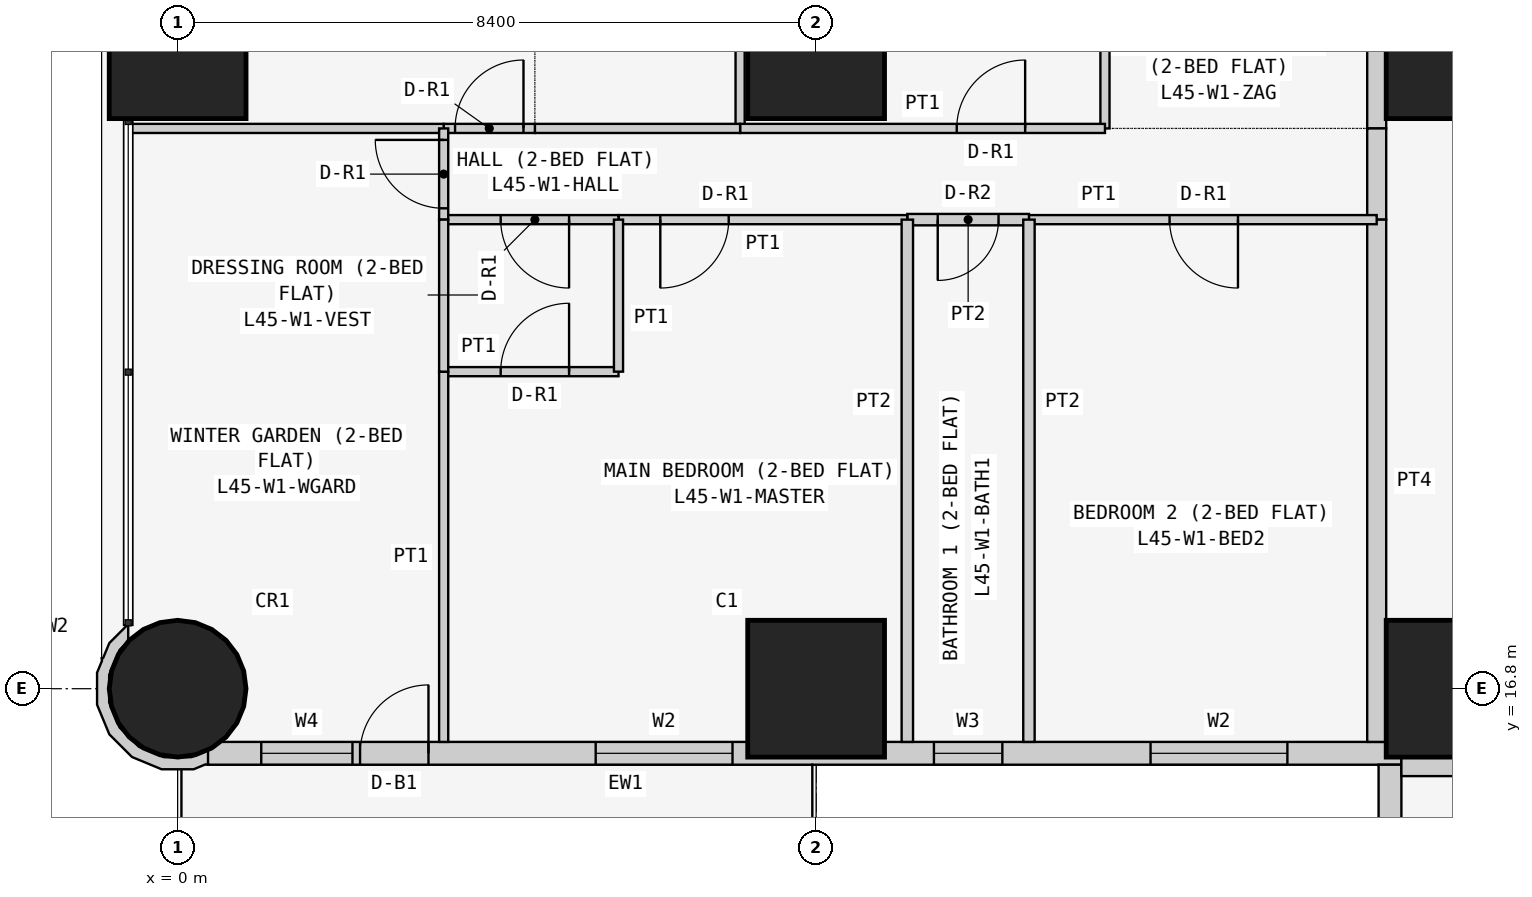
"""IFC4 building model, lengths in metres.
Left out: names, types, materials, properties, quantities, classifications, styles, units other than length and angle.
Written with IfcOpenShell. Run it as: python <this file> out.ifc"""

import sys

from ifc_helpers import new_model, si_unit, direction, frame, frame_2d, origin, origin_2d, place, context, subcontext, project, spatial, polyline, rectangle, circle, outline, extrude, element, fill, save


model = new_model("IFC4")
c1 = context("Model", 3, precision=1e-05, world=origin(), true_north=direction((0.0, 1.0)))
c2 = subcontext(c1, "Body", "Model", "MODEL_VIEW")
j1 = project(units=[si_unit("LENGTHUNIT", "METRE"), si_unit("PLANEANGLEUNIT", "RADIAN")], contexts=[c1])
p1 = place(None, origin())
s1 = spatial("IfcSite", under=j1, at=p1, CompositionType="ELEMENT")
p2 = place(p1, origin())
s2 = spatial("IfcBuilding", under=s1, at=p2, CompositionType="ELEMENT")
p3 = place(p2, frame((0.0, 0.0, 173.7)))
s3 = spatial("IfcBuildingStorey", under=s2, at=p3, CompositionType="ELEMENT", Elevation=173.7)
p4 = place(p3, frame((0.0, 16.8, 0.0), z_axis=(0.0, 0.0, 1.0), x_axis=(1.0, 0.0, 0.0)))
e1 = element("IfcColumn", 1, at=p4, inside=s3, PredefinedType="COLUMN", context=c2, shape_type="SweptSolid", body=[
    extrude(circle(Radius=0.9, at=origin_2d()), origin(), (0.0, 0.0, 1.0), 3.6),
])
for number, where, z_axis, x_axis in (
    (2, (0.0, 25.2, 0.0), (0.0, 0.0, 1.0), (1.0, 0.0, 0.0)),
    (3, (8.4, 16.8, 0.0), (0.0, 0.0, 1.0), (1.0, 0.0, 0.0)),
    (4, (8.4, 25.2, 0.0), (0.0, 0.0, 1.0), (1.0, 0.0, 0.0)),
    (5, (16.8, 16.8, 0.0), (0.0, 0.0, 1.0), (1.0, 0.0, 0.0)),
    (6, (16.8, 25.2, 0.0), (0.0, 0.0, 1.0), (1.0, 0.0, 0.0)),
):
    element("IfcColumn", number, at=place(p3, frame(where, z_axis=z_axis, x_axis=x_axis)), inside=s3, PredefinedType="COLUMN", context=c2, shape_type="SweptSolid", body=[
        extrude(rectangle(XDim=1.8, YDim=1.8, at=origin_2d()), origin(), (0.0, 0.0, 1.0), 3.6),
    ])
p5 = place(p3, frame((0.4, 15.95, 0.0), z_axis=(0.0, 0.0, 1.0), x_axis=(1.0, 0.0, 0.0)))
e7 = element("IfcWall", 7, at=p5, inside=s3, PredefinedType="SOLIDWALL", context=c2, shape_type="SweptSolid", body=[
    extrude(rectangle(XDim=15.7, YDim=0.3, at=frame_2d((7.85, 0.0))), origin(), (0.0, 0.0, 1.0), 3.35),
])
p6 = place(p5, frame((12.4, 0.0, 0.9)))
e8 = element("IfcOpeningElement", 8, at=p6, cuts=e7, PredefinedType="OPENING", context=c2, shape_type="SweptSolid", body=[
    extrude(rectangle(XDim=1.8, YDim=1.5, at=frame_2d((0.9, 0.75))), frame((0.0, 0.16, 0.0), z_axis=(0.0, -1.0, 0.0), x_axis=(1.0, 0.0, 0.0)), (0.0, 0.0, 1.0), 0.32),
])
p7 = place(p5, frame((9.55, 0.0, 1.5)))
e9 = element("IfcOpeningElement", 9, at=p7, cuts=e7, PredefinedType="OPENING", context=c2, shape_type="SweptSolid", body=[
    extrude(rectangle(XDim=0.9, YDim=0.7, at=frame_2d((0.45, 0.35))), frame((0.0, 0.16, 0.0), z_axis=(0.0, -1.0, 0.0), x_axis=(1.0, 0.0, 0.0)), (0.0, 0.0, 1.0), 0.32),
])
p8 = place(p5, frame((5.1, 0.0, 0.9)))
e10 = element("IfcOpeningElement", 10, at=p8, cuts=e7, PredefinedType="OPENING", context=c2, shape_type="SweptSolid", body=[
    extrude(rectangle(XDim=1.8, YDim=1.5, at=frame_2d((0.9, 0.75))), frame((0.0, 0.16, 0.0), z_axis=(0.0, -1.0, 0.0), x_axis=(1.0, 0.0, 0.0)), (0.0, 0.0, 1.0), 0.32),
])
p9 = place(p5, frame((2.0, 0.0, 0.0)))
e11 = element("IfcOpeningElement", 11, at=p9, cuts=e7, PredefinedType="OPENING", context=c2, shape_type="SweptSolid", body=[
    extrude(rectangle(XDim=0.9, YDim=2.4, at=frame_2d((0.45, 1.2))), frame((0.0, 0.16, 0.0), z_axis=(0.0, -1.0, 0.0), x_axis=(1.0, 0.0, 0.0)), (0.0, 0.0, 1.0), 0.32),
])
p10 = place(p5, frame((0.7, 0.0, 0.9)))
e12 = element("IfcOpeningElement", 12, at=p10, cuts=e7, PredefinedType="OPENING", context=c2, shape_type="SweptSolid", body=[
    extrude(rectangle(XDim=1.2, YDim=1.5, at=frame_2d((0.6, 0.75))), frame((0.0, 0.16, 0.0), z_axis=(0.0, -1.0, 0.0), x_axis=(1.0, 0.0, 0.0)), (0.0, 0.0, 1.0), 0.32),
])
p11 = place(p3, frame((15.95, 15.8, 0.0), z_axis=(0.0, 0.0, 1.0), x_axis=(0.0, -1.0, 0.0)))
e13 = element("IfcWall", 13, at=p11, inside=s3, PredefinedType="SOLIDWALL", context=c2, shape_type="SweptSolid", body=[
    extrude(rectangle(XDim=7.0, YDim=0.3, at=frame_2d((3.5, 0.0))), origin(), (0.0, 0.0, 1.0), 3.35),
])
p12 = place(p11, frame((1.5, 0.0, 0.9)))
e14 = element("IfcOpeningElement", 14, at=p12, cuts=e13, PredefinedType="OPENING", context=c2, shape_type="SweptSolid", body=[
    extrude(rectangle(XDim=2.4, YDim=1.5, at=frame_2d((1.2, 0.75))), frame((0.0, 0.16, 0.0), z_axis=(0.0, -1.0, 0.0), x_axis=(1.0, 0.0, 0.0)), (0.0, 0.0, 1.0), 0.32),
])
p13 = place(p11, frame((5.05, 0.0, 0.9)))
e15 = element("IfcOpeningElement", 15, at=p13, cuts=e13, PredefinedType="OPENING", context=c2, shape_type="SweptSolid", body=[
    extrude(rectangle(XDim=1.2, YDim=1.5, at=frame_2d((0.6, 0.75))), frame((0.0, 0.16, 0.0), z_axis=(0.0, -1.0, 0.0), x_axis=(1.0, 0.0, 0.0)), (0.0, 0.0, 1.0), 0.32),
])
p14 = place(p3, frame((-0.611, 17.567, 0.0), z_axis=(0.0, 0.0, 1.0), x_axis=(-0.926129809145, -0.377204953059, 0.0)))
e16 = element("IfcWall", 16, at=p14, inside=s3, PredefinedType="SOLIDWALL", context=c2, shape_type="SweptSolid", body=[
    extrude(outline(polyline([(-0.269, 2.017), (-0.37, 1.841), (-0.102, 1.842), (0.23, 1.707), (0.485, 1.455), (0.624, 1.125), (0.626, 0.766), (0.49, 0.434), (0.239, 0.179), (0.09, 0.117), (0.011, -0.078), (0.024, -0.083), (0.33, 0.045), (0.48, 0.197), (0.499, 0.193), (0.508, 0.225), (0.626, 0.345), (0.785, 0.736), (0.782, 1.157), (0.619, 1.546), (0.319, 1.842), (-0.072, 2.001), (-0.24, 2.0), (-0.269, 2.017)])), origin(), (0.0, 0.0, 1.0), 3.35),
])
p15 = place(p3, frame((22.971, 15.775, 0.0), z_axis=(0.0, 0.0, 1.0), x_axis=(-1.0, 0.0, 0.0)))
e17 = element("IfcWall", 17, at=p15, inside=s3, PredefinedType="PARTITIONING", context=c2, shape_type="SweptSolid", body=[
    extrude(rectangle(XDim=6.871, YDim=0.25, at=frame_2d((3.436, 0.0))), origin(), (0.0, 0.0, 1.0), 3.35),
])
p16 = place(p3, frame((15.775, 24.171, 0.0), z_axis=(0.0, 0.0, 1.0), x_axis=(0.0, 1.0, 0.0)))
e18 = element("IfcWall", 18, at=p16, inside=s3, PredefinedType="PARTITIONING", context=c2, shape_type="SweptSolid", body=[
    extrude(rectangle(XDim=5.229, YDim=0.25, at=frame_2d((2.615, 0.0))), origin(), (0.0, 0.0, 1.0), 3.35),
])
p17 = place(p16, frame((2.129, 0.0, 0.0)))
e19 = element("IfcOpeningElement", 19, at=p17, cuts=e18, PredefinedType="OPENING", context=c2, shape_type="SweptSolid", body=[
    extrude(rectangle(XDim=1.0, YDim=2.1, at=frame_2d((0.5, 1.05))), frame((0.0, 0.135, 0.0), z_axis=(0.0, -1.0, 0.0), x_axis=(1.0, 0.0, 0.0)), (0.0, 0.0, 1.0), 0.27),
])
p18 = place(p3, frame((15.775, 22.971, 0.0), z_axis=(0.0, 0.0, 1.0), x_axis=(0.0, 1.0, 0.0)))
e20 = element("IfcWall", 20, at=p18, inside=s3, PredefinedType="PARTITIONING", context=c2, shape_type="SweptSolid", body=[
    extrude(rectangle(XDim=1.2, YDim=0.25, at=frame_2d((0.6, 0.0))), origin(), (0.0, 0.0, 1.0), 3.35),
])
p19 = place(p3, frame((15.775, 16.1, 0.0), z_axis=(0.0, 0.0, 1.0), x_axis=(0.0, 1.0, 0.0)))
e21 = element("IfcWall", 21, at=p19, inside=s3, PredefinedType="PARTITIONING", context=c2, shape_type="SweptSolid", body=[
    extrude(rectangle(XDim=6.871, YDim=0.25, at=frame_2d((3.436, 0.0))), origin(), (0.0, 0.0, 1.0), 3.35),
])
for number, where, z_axis, x_axis in (
    (22, (12.2, 29.4, 0.0), (0.0, 0.0, 1.0), (0.0, -1.0, 0.0)),
    (23, (7.4, 29.4, 0.0), (0.0, 0.0, 1.0), (0.0, -1.0, 0.0)),
):
    element("IfcWall", number, at=place(p3, frame(where, z_axis=z_axis, x_axis=x_axis)), inside=s3, PredefinedType="PARTITIONING", context=c2, shape_type="SweptSolid", body=[
        extrude(rectangle(XDim=5.229, YDim=0.12, at=frame_2d((2.615, 0.0))), origin(), (0.0, 0.0, 1.0), 3.35),
    ])
p20 = place(p3, frame((7.4, 24.171, 0.0), z_axis=(0.0, 0.0, 1.0), x_axis=(1.0, 0.0, 0.0)))
e24 = element("IfcWall", 24, at=p20, inside=s3, PredefinedType="PARTITIONING", context=c2, shape_type="SweptSolid", body=[
    extrude(rectangle(XDim=4.8, YDim=0.12, at=frame_2d((2.4, 0.0))), origin(), (0.0, 0.0, 1.0), 3.35),
])
p21 = place(p20, frame((2.85, 0.0, 0.0)))
e25 = element("IfcOpeningElement", 25, at=p21, cuts=e24, PredefinedType="OPENING", context=c2, shape_type="SweptSolid", body=[
    extrude(rectangle(XDim=0.9, YDim=2.1, at=frame_2d((0.45, 1.05))), frame((0.0, 0.07, 0.0), z_axis=(0.0, -1.0, 0.0), x_axis=(1.0, 0.0, 0.0)), (0.0, 0.0, 1.0), 0.14),
])
p22 = place(p3, frame((4.7, 24.171, 0.0), z_axis=(0.0, 0.0, 1.0), x_axis=(1.0, 0.0, 0.0)))
e26 = element("IfcWall", 26, at=p22, inside=s3, PredefinedType="PARTITIONING", context=c2, shape_type="SweptSolid", body=[
    extrude(rectangle(XDim=2.7, YDim=0.12, at=frame_2d((1.35, 0.0))), origin(), (0.0, 0.0, 1.0), 3.35),
])
p23 = place(p3, frame((3.5, 24.171, 0.0), z_axis=(0.0, 0.0, 1.0), x_axis=(1.0, 0.0, 0.0)))
e27 = element("IfcWall", 27, at=p23, inside=s3, PredefinedType="PARTITIONING", context=c2, shape_type="SweptSolid", body=[
    extrude(rectangle(XDim=1.2, YDim=0.12, at=frame_2d((0.6, 0.0))), origin(), (0.0, 0.0, 1.0), 3.35),
])
p24 = place(p23, frame((0.15, 0.0, 0.0)))
e28 = element("IfcOpeningElement", 28, at=p24, cuts=e27, PredefinedType="OPENING", context=c2, shape_type="SweptSolid", body=[
    extrude(rectangle(XDim=0.9, YDim=2.1, at=frame_2d((0.45, 1.05))), frame((0.0, 0.07, 0.0), z_axis=(0.0, -1.0, 0.0), x_axis=(1.0, 0.0, 0.0)), (0.0, 0.0, 1.0), 0.14),
])
p25 = place(p3, frame((-0.65, 24.171, 0.0), z_axis=(0.0, 0.0, 1.0), x_axis=(1.0, 0.0, 0.0)))
e29 = element("IfcWall", 29, at=p25, inside=s3, PredefinedType="PARTITIONING", context=c2, shape_type="SweptSolid", body=[
    extrude(rectangle(XDim=4.15, YDim=0.12, at=frame_2d((2.075, 0.0))), origin(), (0.0, 0.0, 1.0), 3.35),
])
p26 = place(p3, frame((11.2, 22.971, 0.0), z_axis=(0.0, 0.0, 1.0), x_axis=(1.0, 0.0, 0.0)))
e30 = element("IfcWall", 30, at=p26, inside=s3, PredefinedType="PARTITIONING", context=c2, shape_type="SweptSolid", body=[
    extrude(rectangle(XDim=4.575, YDim=0.12, at=frame_2d((2.288, 0.0))), origin(), (0.0, 0.0, 1.0), 3.35),
])
p27 = place(p26, frame((1.85, 0.0, 0.0)))
e31 = element("IfcOpeningElement", 31, at=p27, cuts=e30, PredefinedType="OPENING", context=c2, shape_type="SweptSolid", body=[
    extrude(rectangle(XDim=0.9, YDim=2.1, at=frame_2d((0.45, 1.05))), frame((0.0, 0.07, 0.0), z_axis=(0.0, -1.0, 0.0), x_axis=(1.0, 0.0, 0.0)), (0.0, 0.0, 1.0), 0.14),
])
p28 = place(p3, frame((9.6, 22.971, 0.0), z_axis=(0.0, 0.0, 1.0), x_axis=(1.0, 0.0, 0.0)))
e32 = element("IfcWall", 32, at=p28, inside=s3, PredefinedType="PARTITIONING", context=c2, shape_type="SweptSolid", body=[
    extrude(rectangle(XDim=1.6, YDim=0.15, at=frame_2d((0.8, 0.0))), origin(), (0.0, 0.0, 1.0), 3.35),
])
p29 = place(p28, frame((0.4, 0.0, 0.0)))
e33 = element("IfcOpeningElement", 33, at=p29, cuts=e32, PredefinedType="OPENING", context=c2, shape_type="SweptSolid", body=[
    extrude(rectangle(XDim=0.8, YDim=2.1, at=frame_2d((0.4, 1.05))), frame((0.0, 0.085, 0.0), z_axis=(0.0, -1.0, 0.0), x_axis=(1.0, 0.0, 0.0)), (0.0, 0.0, 1.0), 0.17),
])
p30 = place(p3, frame((5.8, 22.971, 0.0), z_axis=(0.0, 0.0, 1.0), x_axis=(1.0, 0.0, 0.0)))
e34 = element("IfcWall", 34, at=p30, inside=s3, PredefinedType="PARTITIONING", context=c2, shape_type="SweptSolid", body=[
    extrude(rectangle(XDim=3.8, YDim=0.12, at=frame_2d((1.9, 0.0))), origin(), (0.0, 0.0, 1.0), 3.35),
])
p31 = place(p30, frame((0.55, 0.0, 0.0)))
e35 = element("IfcOpeningElement", 35, at=p31, cuts=e34, PredefinedType="OPENING", context=c2, shape_type="SweptSolid", body=[
    extrude(rectangle(XDim=0.9, YDim=2.1, at=frame_2d((0.45, 1.05))), frame((0.0, 0.07, 0.0), z_axis=(0.0, -1.0, 0.0), x_axis=(1.0, 0.0, 0.0)), (0.0, 0.0, 1.0), 0.14),
])
p32 = place(p3, frame((3.5, 22.971, 0.0), z_axis=(0.0, 0.0, 1.0), x_axis=(1.0, 0.0, 0.0)))
e36 = element("IfcWall", 36, at=p32, inside=s3, PredefinedType="PARTITIONING", context=c2, shape_type="SweptSolid", body=[
    extrude(rectangle(XDim=2.3, YDim=0.12, at=frame_2d((1.15, 0.0))), origin(), (0.0, 0.0, 1.0), 3.35),
])
p33 = place(p32, frame((0.75, 0.0, 0.0)))
e37 = element("IfcOpeningElement", 37, at=p33, cuts=e36, PredefinedType="OPENING", context=c2, shape_type="SweptSolid", body=[
    extrude(rectangle(XDim=0.9, YDim=2.1, at=frame_2d((0.45, 1.05))), frame((0.0, 0.07, 0.0), z_axis=(0.0, -1.0, 0.0), x_axis=(1.0, 0.0, 0.0)), (0.0, 0.0, 1.0), 0.14),
])
p34 = place(p3, frame((3.5, 24.171, 0.0), z_axis=(0.0, 0.0, 1.0), x_axis=(0.0, -1.0, 0.0)))
e38 = element("IfcWall", 38, at=p34, inside=s3, PredefinedType="PARTITIONING", context=c2, shape_type="SweptSolid", body=[
    extrude(rectangle(XDim=1.2, YDim=0.12, at=frame_2d((0.6, 0.0))), origin(), (0.0, 0.0, 1.0), 3.35),
])
p35 = place(p34, frame((0.151, 0.0, 0.0)))
e39 = element("IfcOpeningElement", 39, at=p35, cuts=e38, PredefinedType="OPENING", context=c2, shape_type="SweptSolid", body=[
    extrude(rectangle(XDim=0.9, YDim=2.1, at=frame_2d((0.45, 1.05))), frame((0.0, 0.07, 0.0), z_axis=(0.0, -1.0, 0.0), x_axis=(1.0, 0.0, 0.0)), (0.0, 0.0, 1.0), 0.14),
])
for number, where, z_axis, x_axis in (
    (40, (11.2, 22.971, 0.0), (0.0, 0.0, 1.0), (0.0, -1.0, 0.0)),
    (41, (9.6, 22.971, 0.0), (0.0, 0.0, 1.0), (0.0, -1.0, 0.0)),
):
    element("IfcWall", number, at=place(p3, frame(where, z_axis=z_axis, x_axis=x_axis)), inside=s3, PredefinedType="PARTITIONING", context=c2, shape_type="SweptSolid", body=[
        extrude(rectangle(XDim=6.871, YDim=0.15, at=frame_2d((3.436, 0.0))), origin(), (0.0, 0.0, 1.0), 3.35),
    ])
p36 = place(p3, frame((3.5, 20.971, 0.0), z_axis=(0.0, 0.0, 1.0), x_axis=(1.0, 0.0, 0.0)))
e42 = element("IfcWall", 42, at=p36, inside=s3, PredefinedType="PARTITIONING", context=c2, shape_type="SweptSolid", body=[
    extrude(rectangle(XDim=2.3, YDim=0.12, at=frame_2d((1.15, 0.0))), origin(), (0.0, 0.0, 1.0), 3.35),
])
p37 = place(p36, frame((0.75, 0.0, 0.0)))
e43 = element("IfcOpeningElement", 43, at=p37, cuts=e42, PredefinedType="OPENING", context=c2, shape_type="SweptSolid", body=[
    extrude(rectangle(XDim=0.9, YDim=2.1, at=frame_2d((0.45, 1.05))), frame((0.0, 0.07, 0.0), z_axis=(0.0, -1.0, 0.0), x_axis=(1.0, 0.0, 0.0)), (0.0, 0.0, 1.0), 0.14),
])
p38 = place(p3, frame((5.8, 20.971, 0.0), z_axis=(0.0, 0.0, 1.0), x_axis=(0.0, 1.0, 0.0)))
e44 = element("IfcWall", 44, at=p38, inside=s3, PredefinedType="PARTITIONING", context=c2, shape_type="SweptSolid", body=[
    extrude(rectangle(XDim=2.0, YDim=0.12, at=frame_2d((1.0, 0.0))), origin(), (0.0, 0.0, 1.0), 3.35),
])
p39 = place(p3, frame((3.5, 16.1, 0.0), z_axis=(0.0, 0.0, 1.0), x_axis=(0.0, 1.0, 0.0)))
e45 = element("IfcWall", 45, at=p39, inside=s3, PredefinedType="PARTITIONING", context=c2, shape_type="SweptSolid", body=[
    extrude(rectangle(XDim=4.871, YDim=0.12, at=frame_2d((2.436, 0.0))), origin(), (0.0, 0.0, 1.0), 3.35),
])
p40 = place(p3, frame((3.5, 22.971, 0.0), z_axis=(0.0, 0.0, 1.0), x_axis=(0.0, -1.0, 0.0)))
e46 = element("IfcWall", 46, at=p40, inside=s3, PredefinedType="PARTITIONING", context=c2, shape_type="SweptSolid", body=[
    extrude(rectangle(XDim=2.0, YDim=0.12, at=frame_2d((1.0, 0.0))), origin(), (0.0, 0.0, 1.0), 3.35),
])
p41 = place(p6, origin())
e47 = element("IfcWindow", 47, at=p41, inside=s3, PartitioningType="SINGLE_PANEL", PredefinedType="WINDOW", context=c2, shape_type="SweptSolid", body=[
    extrude(rectangle(XDim=1.8, YDim=1.5, at=frame_2d((0.9, 0.75))), frame((0.0, 0.03, 0.0), z_axis=(0.0, -1.0, 0.0), x_axis=(1.0, 0.0, 0.0)), (0.0, 0.0, 1.0), 0.06),
])
fill(e8, e47)
p42 = place(p7, origin())
e48 = element("IfcWindow", 48, at=p42, inside=s3, PartitioningType="SINGLE_PANEL", PredefinedType="WINDOW", context=c2, shape_type="SweptSolid", body=[
    extrude(rectangle(XDim=0.9, YDim=0.7, at=frame_2d((0.45, 0.35))), frame((0.0, 0.03, 0.0), z_axis=(0.0, -1.0, 0.0), x_axis=(1.0, 0.0, 0.0)), (0.0, 0.0, 1.0), 0.06),
])
fill(e9, e48)
p43 = place(p8, origin())
e49 = element("IfcWindow", 49, at=p43, inside=s3, PartitioningType="SINGLE_PANEL", PredefinedType="WINDOW", context=c2, shape_type="SweptSolid", body=[
    extrude(rectangle(XDim=1.8, YDim=1.5, at=frame_2d((0.9, 0.75))), frame((0.0, 0.03, 0.0), z_axis=(0.0, -1.0, 0.0), x_axis=(1.0, 0.0, 0.0)), (0.0, 0.0, 1.0), 0.06),
])
fill(e10, e49)
p44 = place(p9, origin())
e50 = element("IfcDoor", 50, at=p44, inside=s3, OperationType="SINGLE_SWING_RIGHT", PredefinedType="DOOR", context=c2, shape_type="SweptSolid", body=[
    extrude(rectangle(XDim=0.9, YDim=2.4, at=frame_2d((0.45, 1.2))), frame((0.0, 0.025, 0.0), z_axis=(0.0, -1.0, 0.0), x_axis=(1.0, 0.0, 0.0)), (0.0, 0.0, 1.0), 0.05),
])
fill(e11, e50)
p45 = place(p10, origin())
e51 = element("IfcWindow", 51, at=p45, inside=s3, PartitioningType="SINGLE_PANEL", PredefinedType="WINDOW", context=c2, shape_type="SweptSolid", body=[
    extrude(rectangle(XDim=1.2, YDim=1.5, at=frame_2d((0.6, 0.75))), frame((0.0, 0.03, 0.0), z_axis=(0.0, -1.0, 0.0), x_axis=(1.0, 0.0, 0.0)), (0.0, 0.0, 1.0), 0.06),
])
fill(e12, e51)
p46 = place(p21, origin())
e52 = element("IfcDoor", 52, at=p46, inside=s3, OperationType="SINGLE_SWING_RIGHT", PredefinedType="DOOR", context=c2, shape_type="SweptSolid", body=[
    extrude(rectangle(XDim=0.9, YDim=2.1, at=frame_2d((0.45, 1.05))), frame((0.0, 0.025, 0.0), z_axis=(0.0, -1.0, 0.0), x_axis=(1.0, 0.0, 0.0)), (0.0, 0.0, 1.0), 0.05),
])
fill(e25, e52)
p47 = place(p24, origin())
e53 = element("IfcDoor", 53, at=p47, inside=s3, OperationType="SINGLE_SWING_RIGHT", PredefinedType="DOOR", context=c2, shape_type="SweptSolid", body=[
    extrude(rectangle(XDim=0.9, YDim=2.1, at=frame_2d((0.45, 1.05))), frame((0.0, 0.025, 0.0), z_axis=(0.0, -1.0, 0.0), x_axis=(1.0, 0.0, 0.0)), (0.0, 0.0, 1.0), 0.05),
])
fill(e28, e53)
p48 = place(p27, frame((0.9, 0.0, 0.0), z_axis=(0.0, 0.0, 1.0), x_axis=(-1.0, 0.0, 0.0)))
e54 = element("IfcDoor", 54, at=p48, inside=s3, OperationType="SINGLE_SWING_LEFT", PredefinedType="DOOR", context=c2, shape_type="SweptSolid", body=[
    extrude(rectangle(XDim=0.9, YDim=2.1, at=frame_2d((0.45, 1.05))), frame((0.0, 0.025, 0.0), z_axis=(0.0, -1.0, 0.0), x_axis=(1.0, 0.0, 0.0)), (0.0, 0.0, 1.0), 0.05),
])
fill(e31, e54)
p49 = place(p29, frame((0.8, 0.0, 0.0), z_axis=(0.0, 0.0, 1.0), x_axis=(-1.0, 0.0, 0.0)))
e55 = element("IfcDoor", 55, at=p49, inside=s3, OperationType="SINGLE_SWING_RIGHT", PredefinedType="DOOR", context=c2, shape_type="SweptSolid", body=[
    extrude(rectangle(XDim=0.8, YDim=2.1, at=frame_2d((0.4, 1.05))), frame((0.0, 0.025, 0.0), z_axis=(0.0, -1.0, 0.0), x_axis=(1.0, 0.0, 0.0)), (0.0, 0.0, 1.0), 0.05),
])
fill(e33, e55)
p50 = place(p31, frame((0.9, 0.0, 0.0), z_axis=(0.0, 0.0, 1.0), x_axis=(-1.0, 0.0, 0.0)))
e56 = element("IfcDoor", 56, at=p50, inside=s3, OperationType="SINGLE_SWING_RIGHT", PredefinedType="DOOR", context=c2, shape_type="SweptSolid", body=[
    extrude(rectangle(XDim=0.9, YDim=2.1, at=frame_2d((0.45, 1.05))), frame((0.0, 0.025, 0.0), z_axis=(0.0, -1.0, 0.0), x_axis=(1.0, 0.0, 0.0)), (0.0, 0.0, 1.0), 0.05),
])
fill(e35, e56)
p51 = place(p33, frame((0.9, 0.0, 0.0), z_axis=(0.0, 0.0, 1.0), x_axis=(-1.0, 0.0, 0.0)))
e57 = element("IfcDoor", 57, at=p51, inside=s3, OperationType="SINGLE_SWING_LEFT", PredefinedType="DOOR", context=c2, shape_type="SweptSolid", body=[
    extrude(rectangle(XDim=0.9, YDim=2.1, at=frame_2d((0.45, 1.05))), frame((0.0, 0.025, 0.0), z_axis=(0.0, -1.0, 0.0), x_axis=(1.0, 0.0, 0.0)), (0.0, 0.0, 1.0), 0.05),
])
fill(e37, e57)
p52 = place(p37, origin())
e58 = element("IfcDoor", 58, at=p52, inside=s3, OperationType="SINGLE_SWING_RIGHT", PredefinedType="DOOR", context=c2, shape_type="SweptSolid", body=[
    extrude(rectangle(XDim=0.9, YDim=2.1, at=frame_2d((0.45, 1.05))), frame((0.0, 0.025, 0.0), z_axis=(0.0, -1.0, 0.0), x_axis=(1.0, 0.0, 0.0)), (0.0, 0.0, 1.0), 0.05),
])
fill(e43, e58)
p53 = place(p35, frame((0.9, 0.0, 0.0), z_axis=(0.0, 0.0, 1.0), x_axis=(-1.0, 0.0, 0.0)))
e59 = element("IfcDoor", 59, at=p53, inside=s3, OperationType="SINGLE_SWING_RIGHT", PredefinedType="DOOR", context=c2, shape_type="SweptSolid", body=[
    extrude(rectangle(XDim=0.9, YDim=2.1, at=frame_2d((0.45, 1.05))), frame((0.0, 0.025, 0.0), z_axis=(0.0, -1.0, 0.0), x_axis=(1.0, 0.0, 0.0)), (0.0, 0.0, 1.0), 0.05),
])
fill(e39, e59)
save(model, sys.argv[1])
